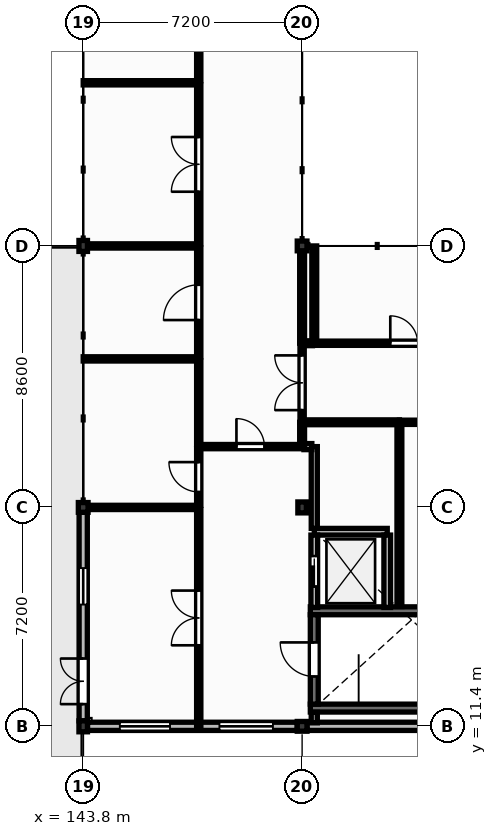
"""IFC4 building model, lengths in metres.
Left out: names, types, materials, properties, quantities, classifications, styles, units other than length and angle.
Written with IfcOpenShell. Run it as: python <this file> out.ifc"""

import sys

from ifc_helpers import new_model, si_unit, direction, frame, frame_2d, origin, origin_2d, place, context, subcontext, project, spatial, rectangle, extrude, element, fill, save


model = new_model("IFC4")
c1 = context("Model", 3, precision=1e-05, world=origin(), true_north=direction((0.0, 1.0)))
c2 = subcontext(c1, "Body", "Model", "MODEL_VIEW")
j1 = project(units=[si_unit("LENGTHUNIT", "METRE"), si_unit("PLANEANGLEUNIT", "RADIAN")], contexts=[c1])
p1 = place(None, origin())
s1 = spatial("IfcSite", under=j1, at=p1, CompositionType="ELEMENT")
p2 = place(p1, origin())
s2 = spatial("IfcBuilding", under=s1, at=p2, CompositionType="ELEMENT")
p3 = place(p2, frame((0.0, 0.0, 9.0)))
s3 = spatial("IfcBuildingStorey", under=s2, at=p3, CompositionType="ELEMENT", Elevation=9.0)
p4 = place(p3, frame((143.8, 11.4, 0.0), z_axis=(0.0, 0.0, 1.0), x_axis=(1.0, 0.0, 0.0)))
e1 = element("IfcColumn", 1, at=p4, inside=s3, PredefinedType="COLUMN", context=c2, shape_type="SweptSolid", body=[
    extrude(rectangle(XDim=0.28, YDim=0.36, at=origin_2d()), origin(), (0.0, 0.0, 1.0), 3.98),
])
p5 = place(p3, frame((143.8, 18.6, 0.0), z_axis=(0.0, 0.0, 1.0), x_axis=(1.0, 0.0, 0.0)))
e2 = element("IfcColumn", 2, at=p5, inside=s3, PredefinedType="COLUMN", context=c2, shape_type="SweptSolid", body=[
    extrude(rectangle(XDim=0.32, YDim=0.32, at=origin_2d()), origin(), (0.0, 0.0, 1.0), 3.98),
])
p6 = place(p3, frame((143.8, 27.2, 0.0), z_axis=(0.0, 0.0, 1.0), x_axis=(1.0, 0.0, 0.0)))
e3 = element("IfcColumn", 3, at=p6, inside=s3, PredefinedType="COLUMN", context=c2, shape_type="SweptSolid", body=[
    extrude(rectangle(XDim=0.28, YDim=0.36, at=origin_2d()), origin(), (0.0, 0.0, 1.0), 3.98),
])
p7 = place(p3, frame((151.0, 11.4, 0.0), z_axis=(0.0, 0.0, 1.0), x_axis=(1.0, 0.0, 0.0)))
e4 = element("IfcColumn", 4, at=p7, inside=s3, PredefinedType="COLUMN", context=c2, shape_type="SweptSolid", body=[
    extrude(rectangle(XDim=0.32, YDim=0.32, at=origin_2d()), origin(), (0.0, 0.0, 1.0), 5.775),
])
p8 = place(p3, frame((151.0, 18.6, 0.0), z_axis=(0.0, 0.0, 1.0), x_axis=(1.0, 0.0, 0.0)))
e5 = element("IfcColumn", 5, at=p8, inside=s3, PredefinedType="COLUMN", context=c2, shape_type="SweptSolid", body=[
    extrude(rectangle(XDim=0.28, YDim=0.36, at=origin_2d()), origin(), (0.0, 0.0, 1.0), 5.775),
])
p9 = place(p3, frame((151.0, 27.2, 0.0), z_axis=(0.0, 0.0, 1.0), x_axis=(1.0, 0.0, 0.0)))
e6 = element("IfcColumn", 6, at=p9, inside=s3, PredefinedType="COLUMN", context=c2, shape_type="SweptSolid", body=[
    extrude(rectangle(XDim=0.32, YDim=0.32, at=origin_2d()), origin(), (0.0, 0.0, 1.0), 5.775),
])
p10 = place(p3, frame((143.94, 11.4, 0.0), z_axis=(0.0, 0.0, 1.0), x_axis=(1.0, 0.0, 0.0)))
e7 = element("IfcWall", 7, at=p10, inside=s3, PredefinedType="SOLIDWALL", context=c2, shape_type="SweptSolid", body=[
    extrude(rectangle(XDim=6.9, YDim=0.27, at=frame_2d((3.45, 0.0))), origin(), (0.0, 0.0, 1.0), 3.54),
])
p11 = place(p10, frame((1.065, 0.0, 1.35)))
e8 = element("IfcOpeningElement", 8, at=p11, cuts=e7, PredefinedType="OPENING", context=c2, shape_type="SweptSolid", body=[
    extrude(rectangle(XDim=1.65, YDim=1.4, at=frame_2d((0.825, 0.7))), frame((0.0, 0.145, 0.0), z_axis=(0.0, -1.0, 0.0), x_axis=(1.0, 0.0, 0.0)), (0.0, 0.0, 1.0), 0.29),
])
p12 = place(p10, frame((4.34, 0.0, 1.0)))
e9 = element("IfcOpeningElement", 9, at=p12, cuts=e7, PredefinedType="OPENING", context=c2, shape_type="SweptSolid", body=[
    extrude(rectangle(XDim=1.76, YDim=1.95, at=frame_2d((0.88, 0.975))), frame((0.0, 0.145, 0.0), z_axis=(0.0, -1.0, 0.0), x_axis=(1.0, 0.0, 0.0)), (0.0, 0.0, 1.0), 0.29),
])
p13 = place(p3, frame((143.8, 11.58, 0.0), z_axis=(0.0, 0.0, 1.0), x_axis=(0.0, 1.0, 0.0)))
e10 = element("IfcWall", 10, at=p13, inside=s3, PredefinedType="SOLIDWALL", context=c2, shape_type="SweptSolid", body=[
    extrude(rectangle(XDim=6.86, YDim=0.27, at=frame_2d((3.43, 0.0))), origin(), (0.0, 0.0, 1.0), 4.0),
])
p14 = place(p13, frame((0.55, 0.0, 0.0)))
e11 = element("IfcOpeningElement", 11, at=p14, cuts=e10, PredefinedType="OPENING", context=c2, shape_type="SweptSolid", body=[
    extrude(rectangle(XDim=1.5, YDim=2.3, at=frame_2d((0.75, 1.15))), frame((0.0, 0.145, 0.0), z_axis=(0.0, -1.0, 0.0), x_axis=(1.0, 0.0, 0.0)), (0.0, 0.0, 1.0), 0.29),
])
p15 = place(p13, frame((3.825, 0.0, 1.0)))
e12 = element("IfcOpeningElement", 12, at=p15, cuts=e10, PredefinedType="OPENING", context=c2, shape_type="SweptSolid", body=[
    extrude(rectangle(XDim=1.2, YDim=1.95, at=frame_2d((0.6, 0.975))), frame((0.0, 0.145, 0.0), z_axis=(0.0, -1.0, 0.0), x_axis=(1.0, 0.0, 0.0)), (0.0, 0.0, 1.0), 0.29),
])
p16 = place(p3, frame((151.16, 11.4, 0.0), z_axis=(0.0, 0.0, 1.0), x_axis=(1.0, 0.0, 0.0)))
e13 = element("IfcWall", 13, at=p16, inside=s3, PredefinedType="SOLIDWALL", context=c2, shape_type="SweptSolid", body=[
    extrude(rectangle(XDim=6.9, YDim=0.27, at=frame_2d((3.45, 0.0))), origin(), (0.0, 0.0, 1.0), 3.54),
])
for number, where, z_axis, x_axis in (
    (14, (151.27, 12.0, 0.0), (0.0, 0.0, 1.0), (1.0, 0.0, 0.0)),
    (15, (151.27, 15.2, 0.0), (0.0, 0.0, 1.0), (1.0, 0.0, 0.0)),
):
    element("IfcWall", number, at=place(p3, frame(where, z_axis=z_axis, x_axis=x_axis)), inside=s3, PredefinedType="SHEAR", context=c2, shape_type="SweptSolid", body=[
        extrude(rectangle(XDim=6.66, YDim=0.26, at=frame_2d((3.33, 0.0))), origin(), (0.0, 0.0, 1.0), 3.95),
    ])
p17 = place(p3, frame((151.4, 12.13, 0.0), z_axis=(0.0, 0.0, 1.0), x_axis=(0.0, 1.0, 0.0)))
e16 = element("IfcWall", 16, at=p17, inside=s3, PredefinedType="SHEAR", context=c2, shape_type="SweptSolid", body=[
    extrude(rectangle(XDim=2.94, YDim=0.26, at=frame_2d((1.47, 0.0))), origin(), (0.0, 0.0, 1.0), 3.95),
])
p18 = place(p17, frame((0.91, 0.0, 0.0)))
e17 = element("IfcOpeningElement", 17, at=p18, cuts=e16, PredefinedType="OPENING", context=c2, shape_type="SweptSolid", body=[
    extrude(rectangle(XDim=1.12, YDim=2.1, at=frame_2d((0.56, 1.05))), frame((0.0, 0.14, 0.0), z_axis=(0.0, -1.0, 0.0), x_axis=(1.0, 0.0, 0.0)), (0.0, 0.0, 1.0), 0.28),
])
p19 = place(p3, frame((151.4, 17.8, 0.0), z_axis=(0.0, 0.0, 1.0), x_axis=(1.0, 0.0, 0.0)))
e18 = element("IfcWall", 18, at=p19, inside=s3, PredefinedType="SOLIDWALL", context=c2, shape_type="SweptSolid", body=[
    extrude(rectangle(XDim=2.4, YDim=0.22, at=frame_2d((1.2, 0.0))), origin(), (0.0, 0.0, 1.0), 3.95),
])
p20 = place(p3, frame((151.4, 15.31, 0.0), z_axis=(0.0, 0.0, 1.0), x_axis=(0.0, 1.0, 0.0)))
e19 = element("IfcWall", 19, at=p20, inside=s3, PredefinedType="SOLIDWALL", context=c2, shape_type="SweptSolid", body=[
    extrude(rectangle(XDim=2.38, YDim=0.22, at=frame_2d((1.19, 0.0))), origin(), (0.0, 0.0, 1.0), 3.95),
])
p21 = place(p20, frame((0.69, 0.0, 0.0)))
e20 = element("IfcOpeningElement", 20, at=p21, cuts=e19, PredefinedType="OPENING", context=c2, shape_type="SweptSolid", body=[
    extrude(rectangle(XDim=1.0, YDim=2.15, at=frame_2d((0.5, 1.075))), frame((0.0, 0.12, 0.0), z_axis=(0.0, -1.0, 0.0), x_axis=(1.0, 0.0, 0.0)), (0.0, 0.0, 1.0), 0.24),
])
p22 = place(p3, frame((153.8, 15.31, 0.0), z_axis=(0.0, 0.0, 1.0), x_axis=(0.0, 1.0, 0.0)))
e21 = element("IfcWall", 21, at=p22, inside=s3, PredefinedType="SOLIDWALL", context=c2, shape_type="SweptSolid", body=[
    extrude(rectangle(XDim=2.38, YDim=0.22, at=frame_2d((1.19, 0.0))), origin(), (0.0, 0.0, 1.0), 3.95),
])
p23 = place(p3, frame((143.96, 18.6, 0.0), z_axis=(0.0, 0.0, 1.0), x_axis=(1.0, 0.0, 0.0)))
e22 = element("IfcWall", 22, at=p23, inside=s3, PredefinedType="PARTITIONING", context=c2, shape_type="SweptSolid", body=[
    extrude(rectangle(XDim=3.64, YDim=0.14, at=frame_2d((1.82, 0.0))), origin(), (0.0, 0.0, 1.0), 3.78),
])
p24 = place(p3, frame((143.8, 23.485, 0.0), z_axis=(0.0, 0.0, 1.0), x_axis=(1.0, 0.0, 0.0)))
e23 = element("IfcWall", 23, at=p24, inside=s3, PredefinedType="PARTITIONING", context=c2, shape_type="SweptSolid", body=[
    extrude(rectangle(XDim=3.8, YDim=0.14, at=frame_2d((1.9, 0.0))), origin(), (0.0, 0.0, 1.0), 3.78),
])
p25 = place(p3, frame((143.94, 27.2, 0.0), z_axis=(0.0, 0.0, 1.0), x_axis=(1.0, 0.0, 0.0)))
e24 = element("IfcWall", 24, at=p25, inside=s3, PredefinedType="PARTITIONING", context=c2, shape_type="SweptSolid", body=[
    extrude(rectangle(XDim=3.66, YDim=0.14, at=frame_2d((1.83, 0.0))), origin(), (0.0, 0.0, 1.0), 3.78),
])
p26 = place(p3, frame((143.8, 32.566, 0.0), z_axis=(0.0, 0.0, 1.0), x_axis=(1.0, 0.0, 0.0)))
e25 = element("IfcWall", 25, at=p26, inside=s3, PredefinedType="PARTITIONING", context=c2, shape_type="SweptSolid", body=[
    extrude(rectangle(XDim=3.8, YDim=0.14, at=frame_2d((1.9, 0.0))), origin(), (0.0, 0.0, 1.0), 3.78),
])
p27 = place(p3, frame((147.6, 11.4, 0.0), z_axis=(0.0, 0.0, 1.0), x_axis=(0.0, 1.0, 0.0)))
e26 = element("IfcWall", 26, at=p27, inside=s3, PredefinedType="PARTITIONING", context=c2, shape_type="SweptSolid", body=[
    extrude(rectangle(XDim=7.13, YDim=0.14, at=frame_2d((3.565, 0.0))), origin(), (0.0, 0.0, 1.0), 3.78),
])
p28 = place(p27, frame((2.665, 0.0, 0.0)))
e27 = element("IfcOpeningElement", 27, at=p28, cuts=e26, PredefinedType="OPENING", context=c2, shape_type="SweptSolid", body=[
    extrude(rectangle(XDim=1.8, YDim=2.3, at=frame_2d((0.9, 1.15))), frame((0.0, 0.08, 0.0), z_axis=(0.0, -1.0, 0.0), x_axis=(1.0, 0.0, 0.0)), (0.0, 0.0, 1.0), 0.16),
])
p29 = place(p3, frame((147.6, 18.67, 0.0), z_axis=(0.0, 0.0, 1.0), x_axis=(0.0, 1.0, 0.0)))
e28 = element("IfcWall", 28, at=p29, inside=s3, PredefinedType="PARTITIONING", context=c2, shape_type="SweptSolid", body=[
    extrude(rectangle(XDim=1.86, YDim=0.14, at=frame_2d((0.93, 0.0))), origin(), (0.0, 0.0, 1.0), 3.78),
])
p30 = place(p29, frame((0.44, 0.0, 0.0)))
e29 = element("IfcOpeningElement", 29, at=p30, cuts=e28, PredefinedType="OPENING", context=c2, shape_type="SweptSolid", body=[
    extrude(rectangle(XDim=0.98, YDim=2.15, at=frame_2d((0.49, 1.075))), frame((0.0, 0.08, 0.0), z_axis=(0.0, -1.0, 0.0), x_axis=(1.0, 0.0, 0.0)), (0.0, 0.0, 1.0), 0.16),
])
p31 = place(p3, frame((147.6, 20.67, 0.0), z_axis=(0.0, 0.0, 1.0), x_axis=(0.0, 1.0, 0.0)))
e30 = element("IfcWall", 30, at=p31, inside=s3, PredefinedType="PARTITIONING", context=c2, shape_type="SweptSolid", body=[
    extrude(rectangle(XDim=2.745, YDim=0.14, at=frame_2d((1.373, 0.0))), origin(), (0.0, 0.0, 1.0), 3.78),
])
p32 = place(p3, frame((147.6, 20.6, 0.0), z_axis=(0.0, 0.0, 1.0), x_axis=(1.0, 0.0, 0.0)))
e31 = element("IfcWall", 31, at=p32, inside=s3, PredefinedType="PARTITIONING", context=c2, shape_type="SweptSolid", body=[
    extrude(rectangle(XDim=3.4, YDim=0.14, at=frame_2d((1.7, 0.0))), origin(), (0.0, 0.0, 1.0), 3.78),
])
p33 = place(p32, frame((1.24, 0.0, 0.0)))
e32 = element("IfcOpeningElement", 32, at=p33, cuts=e31, PredefinedType="OPENING", context=c2, shape_type="SweptSolid", body=[
    extrude(rectangle(XDim=0.92, YDim=2.1, at=frame_2d((0.46, 1.05))), frame((0.0, 0.08, 0.0), z_axis=(0.0, -1.0, 0.0), x_axis=(1.0, 0.0, 0.0)), (0.0, 0.0, 1.0), 0.16),
])
p34 = place(p3, frame((147.6, 23.555, 0.0), z_axis=(0.0, 0.0, 1.0), x_axis=(0.0, 1.0, 0.0)))
e33 = element("IfcWall", 33, at=p34, inside=s3, PredefinedType="PARTITIONING", context=c2, shape_type="SweptSolid", body=[
    extrude(rectangle(XDim=3.575, YDim=0.14, at=frame_2d((1.788, 0.0))), origin(), (0.0, 0.0, 1.0), 3.78),
])
p35 = place(p34, frame((1.208, 0.0, 0.0)))
e34 = element("IfcOpeningElement", 34, at=p35, cuts=e33, PredefinedType="OPENING", context=c2, shape_type="SweptSolid", body=[
    extrude(rectangle(XDim=1.16, YDim=2.1, at=frame_2d((0.58, 1.05))), frame((0.0, 0.08, 0.0), z_axis=(0.0, -1.0, 0.0), x_axis=(1.0, 0.0, 0.0)), (0.0, 0.0, 1.0), 0.16),
])
p36 = place(p3, frame((147.6, 27.27, 0.0), z_axis=(0.0, 0.0, 1.0), x_axis=(0.0, 1.0, 0.0)))
e35 = element("IfcWall", 35, at=p36, inside=s3, PredefinedType="PARTITIONING", context=c2, shape_type="SweptSolid", body=[
    extrude(rectangle(XDim=5.226, YDim=0.14, at=frame_2d((2.613, 0.0))), origin(), (0.0, 0.0, 1.0), 3.78),
])
p37 = place(p36, frame((1.713, 0.0, 0.0)))
e36 = element("IfcOpeningElement", 36, at=p37, cuts=e35, PredefinedType="OPENING", context=c2, shape_type="SweptSolid", body=[
    extrude(rectangle(XDim=1.8, YDim=2.3, at=frame_2d((0.9, 1.15))), frame((0.0, 0.08, 0.0), z_axis=(0.0, -1.0, 0.0), x_axis=(1.0, 0.0, 0.0)), (0.0, 0.0, 1.0), 0.16),
])
p38 = place(p3, frame((147.6, 32.636, 0.0), z_axis=(0.0, 0.0, 1.0), x_axis=(0.0, 1.0, 0.0)))
e37 = element("IfcWall", 37, at=p38, inside=s3, PredefinedType="PARTITIONING", context=c2, shape_type="SweptSolid", body=[
    extrude(rectangle(XDim=4.094, YDim=0.14, at=frame_2d((2.047, 0.0))), origin(), (0.0, 0.0, 1.0), 3.78),
])
p39 = place(p38, frame((1.147, 0.0, 0.0)))
e38 = element("IfcOpeningElement", 38, at=p39, cuts=e37, PredefinedType="OPENING", context=c2, shape_type="SweptSolid", body=[
    extrude(rectangle(XDim=1.8, YDim=2.3, at=frame_2d((0.9, 1.15))), frame((0.0, 0.08, 0.0), z_axis=(0.0, -1.0, 0.0), x_axis=(1.0, 0.0, 0.0)), (0.0, 0.0, 1.0), 0.16),
])
p40 = place(p3, frame((151.0, 21.4, 0.0), z_axis=(0.0, 0.0, 1.0), x_axis=(0.0, 1.0, 0.0)))
e39 = element("IfcWall", 39, at=p40, inside=s3, PredefinedType="PARTITIONING", context=c2, shape_type="SweptSolid", body=[
    extrude(rectangle(XDim=2.6, YDim=0.14, at=frame_2d((1.3, 0.0))), origin(), (0.0, 0.0, 1.0), 3.78),
])
p41 = place(p40, frame((0.4, 0.0, 0.0)))
e40 = element("IfcOpeningElement", 40, at=p41, cuts=e39, PredefinedType="OPENING", context=c2, shape_type="SweptSolid", body=[
    extrude(rectangle(XDim=1.8, YDim=2.3, at=frame_2d((0.9, 1.15))), frame((0.0, 0.08, 0.0), z_axis=(0.0, -1.0, 0.0), x_axis=(1.0, 0.0, 0.0)), (0.0, 0.0, 1.0), 0.16),
])
p42 = place(p3, frame((151.4, 24.0, 0.0), z_axis=(0.0, 0.0, 1.0), x_axis=(1.0, 0.0, 0.0)))
e41 = element("IfcWall", 41, at=p42, inside=s3, PredefinedType="PARTITIONING", context=c2, shape_type="SweptSolid", body=[
    extrude(rectangle(XDim=6.8, YDim=0.14, at=frame_2d((3.4, 0.0))), origin(), (0.0, 0.0, 1.0), 3.78),
])
p43 = place(p42, frame((2.5, 0.0, 0.0)))
e42 = element("IfcOpeningElement", 42, at=p43, cuts=e41, PredefinedType="OPENING", context=c2, shape_type="SweptSolid", body=[
    extrude(rectangle(XDim=1.8, YDim=2.3, at=frame_2d((0.9, 1.15))), frame((0.0, 0.08, 0.0), z_axis=(0.0, -1.0, 0.0), x_axis=(1.0, 0.0, 0.0)), (0.0, 0.0, 1.0), 0.16),
])
p44 = place(p3, frame((154.2, 21.4, 0.0), z_axis=(0.0, 0.0, 1.0), x_axis=(1.0, 0.0, 0.0)))
e43 = element("IfcWall", 43, at=p44, inside=s3, PredefinedType="PARTITIONING", context=c2, shape_type="SweptSolid", body=[
    extrude(rectangle(XDim=2.6, YDim=0.14, at=frame_2d((1.3, 0.0))), origin(), (0.0, 0.0, 1.0), 3.78),
])
p45 = place(p44, frame((0.74, 0.0, 0.0)))
e44 = element("IfcOpeningElement", 44, at=p45, cuts=e43, PredefinedType="OPENING", context=c2, shape_type="SweptSolid", body=[
    extrude(rectangle(XDim=1.12, YDim=2.15, at=frame_2d((0.56, 1.075))), frame((0.0, 0.08, 0.0), z_axis=(0.0, -1.0, 0.0), x_axis=(1.0, 0.0, 0.0)), (0.0, 0.0, 1.0), 0.16),
])
p46 = place(p3, frame((151.4, 11.515, 0.0), z_axis=(0.0, 0.0, 1.0), x_axis=(0.0, 1.0, 0.0)))
e45 = element("IfcWall", 45, at=p46, inside=s3, PredefinedType="PARTITIONING", context=c2, shape_type="SweptSolid", body=[
    extrude(rectangle(XDim=0.345, YDim=0.2, at=frame_2d((0.173, 0.0))), origin(), (0.0, 0.0, 1.0), 3.78),
])
p47 = place(p3, frame((151.4, 17.91, 0.0), z_axis=(0.0, 0.0, 1.0), x_axis=(0.0, 1.0, 0.0)))
e46 = element("IfcWall", 46, at=p47, inside=s3, PredefinedType="PARTITIONING", context=c2, shape_type="SweptSolid", body=[
    extrude(rectangle(XDim=2.69, YDim=0.2, at=frame_2d((1.345, 0.0))), origin(), (0.0, 0.0, 1.0), 3.78),
])
p48 = place(p3, frame((151.32, 20.6, 0.0), z_axis=(0.0, 0.0, 1.0), x_axis=(-1.0, 0.0, 0.0)))
e47 = element("IfcWall", 47, at=p48, inside=s3, PredefinedType="PARTITIONING", context=c2, shape_type="SweptSolid", body=[
    extrude(rectangle(XDim=0.26, YDim=0.2, at=frame_2d((0.13, 0.0))), origin(), (0.0, 0.0, 1.0), 3.78),
])
p49 = place(p3, frame((151.0, 20.67, 0.0), z_axis=(0.0, 0.0, 1.0), x_axis=(0.0, 1.0, 0.0)))
e48 = element("IfcWall", 48, at=p49, inside=s3, PredefinedType="PARTITIONING", context=c2, shape_type="SweptSolid", body=[
    extrude(rectangle(XDim=0.73, YDim=0.16, at=frame_2d((0.365, 0.0))), origin(), (0.0, 0.0, 1.0), 3.78),
])
p50 = place(p3, frame((151.0, 24.0, 0.0), z_axis=(0.0, 0.0, 1.0), x_axis=(0.0, 1.0, 0.0)))
e49 = element("IfcWall", 49, at=p50, inside=s3, PredefinedType="PARTITIONING", context=c2, shape_type="SweptSolid", body=[
    extrude(rectangle(XDim=3.04, YDim=0.16, at=frame_2d((1.52, 0.0))), origin(), (0.0, 0.0, 1.0), 3.78),
])
p51 = place(p3, frame((151.0, 21.4, 0.0), z_axis=(0.0, 0.0, 1.0), x_axis=(1.0, 0.0, 0.0)))
e50 = element("IfcWall", 50, at=p51, inside=s3, PredefinedType="PARTITIONING", context=c2, shape_type="SweptSolid", body=[
    extrude(rectangle(XDim=3.2, YDim=0.16, at=frame_2d((1.6, 0.0))), origin(), (0.0, 0.0, 1.0), 3.78),
])
p52 = place(p3, frame((151.34, 24.0, 0.0), z_axis=(0.0, 0.0, 1.0), x_axis=(-1.0, 0.0, 0.0)))
e51 = element("IfcWall", 51, at=p52, inside=s3, PredefinedType="PARTITIONING", context=c2, shape_type="SweptSolid", body=[
    extrude(rectangle(XDim=0.28, YDim=0.16, at=frame_2d((0.14, 0.0))), origin(), (0.0, 0.0, 1.0), 3.78),
])
p53 = place(p3, frame((154.2, 15.34, 0.0), z_axis=(0.0, 0.0, 1.0), x_axis=(0.0, 1.0, 0.0)))
e52 = element("IfcWall", 52, at=p53, inside=s3, PredefinedType="PARTITIONING", context=c2, shape_type="SweptSolid", body=[
    extrude(rectangle(XDim=5.99, YDim=0.16, at=frame_2d((2.995, 0.0))), origin(), (0.0, 0.0, 1.0), 3.78),
])
p54 = place(p3, frame((151.4, 24.07, 0.0), z_axis=(0.0, 0.0, 1.0), x_axis=(0.0, 1.0, 0.0)))
e53 = element("IfcWall", 53, at=p54, inside=s3, PredefinedType="PARTITIONING", context=c2, shape_type="SweptSolid", body=[
    extrude(rectangle(XDim=3.13, YDim=0.16, at=frame_2d((1.565, 0.0))), origin(), (0.0, 0.0, 1.0), 3.78),
])
p55 = place(p11, origin())
e54 = element("IfcWindow", 54, at=p55, inside=s3, PartitioningType="DOUBLE_PANEL_VERTICAL", PredefinedType="WINDOW", context=c2, shape_type="SweptSolid", body=[
    extrude(rectangle(XDim=1.65, YDim=1.4, at=frame_2d((0.825, 0.7))), frame((0.0, 0.03, 0.0), z_axis=(0.0, -1.0, 0.0), x_axis=(1.0, 0.0, 0.0)), (0.0, 0.0, 1.0), 0.06),
])
fill(e8, e54)
p56 = place(p12, origin())
e55 = element("IfcWindow", 55, at=p56, inside=s3, PartitioningType="DOUBLE_PANEL_VERTICAL", PredefinedType="WINDOW", context=c2, shape_type="SweptSolid", body=[
    extrude(rectangle(XDim=1.76, YDim=1.95, at=frame_2d((0.88, 0.975))), frame((0.0, 0.03, 0.0), z_axis=(0.0, -1.0, 0.0), x_axis=(1.0, 0.0, 0.0)), (0.0, 0.0, 1.0), 0.06),
])
fill(e9, e55)
p57 = place(p14, origin())
e56 = element("IfcDoor", 56, at=p57, inside=s3, OperationType="DOUBLE_DOOR_SINGLE_SWING", PredefinedType="DOOR", context=c2, shape_type="SweptSolid", body=[
    extrude(rectangle(XDim=1.5, YDim=2.3, at=frame_2d((0.75, 1.15))), frame((0.0, 0.025, 0.0), z_axis=(0.0, -1.0, 0.0), x_axis=(1.0, 0.0, 0.0)), (0.0, 0.0, 1.0), 0.05),
])
fill(e11, e56)
p58 = place(p15, origin())
e57 = element("IfcWindow", 57, at=p58, inside=s3, PartitioningType="SINGLE_PANEL", PredefinedType="WINDOW", context=c2, shape_type="SweptSolid", body=[
    extrude(rectangle(XDim=1.2, YDim=1.95, at=frame_2d((0.6, 0.975))), frame((0.0, 0.03, 0.0), z_axis=(0.0, -1.0, 0.0), x_axis=(1.0, 0.0, 0.0)), (0.0, 0.0, 1.0), 0.06),
])
fill(e12, e57)
p59 = place(p21, origin())
e58 = element("IfcDoor", 58, at=p59, inside=s3, OperationType="SLIDING_TO_LEFT", PredefinedType="DOOR", context=c2, shape_type="SweptSolid", body=[
    extrude(rectangle(XDim=1.0, YDim=2.15, at=frame_2d((0.5, 1.075))), frame((0.0, 0.025, 0.0), z_axis=(0.0, -1.0, 0.0), x_axis=(1.0, 0.0, 0.0)), (0.0, 0.0, 1.0), 0.05),
])
fill(e20, e58)
p60 = place(p18, origin())
e59 = element("IfcDoor", 59, at=p60, inside=s3, OperationType="SINGLE_SWING_RIGHT", PredefinedType="DOOR", context=c2, shape_type="SweptSolid", body=[
    extrude(rectangle(XDim=1.12, YDim=2.1, at=frame_2d((0.56, 1.05))), frame((0.0, 0.025, 0.0), z_axis=(0.0, -1.0, 0.0), x_axis=(1.0, 0.0, 0.0)), (0.0, 0.0, 1.0), 0.05),
])
fill(e17, e59)
p61 = place(p33, origin())
e60 = element("IfcDoor", 60, at=p61, inside=s3, OperationType="SINGLE_SWING_LEFT", PredefinedType="DOOR", context=c2, shape_type="SweptSolid", body=[
    extrude(rectangle(XDim=0.92, YDim=2.1, at=frame_2d((0.46, 1.05))), frame((0.0, 0.025, 0.0), z_axis=(0.0, -1.0, 0.0), x_axis=(1.0, 0.0, 0.0)), (0.0, 0.0, 1.0), 0.05),
])
fill(e32, e60)
p62 = place(p41, origin())
e61 = element("IfcDoor", 61, at=p62, inside=s3, OperationType="DOUBLE_DOOR_SINGLE_SWING", PredefinedType="DOOR", context=c2, shape_type="SweptSolid", body=[
    extrude(rectangle(XDim=1.8, YDim=2.3, at=frame_2d((0.9, 1.15))), frame((0.0, 0.025, 0.0), z_axis=(0.0, -1.0, 0.0), x_axis=(1.0, 0.0, 0.0)), (0.0, 0.0, 1.0), 0.05),
])
fill(e40, e61)
p63 = place(p28, origin())
e62 = element("IfcDoor", 62, at=p63, inside=s3, OperationType="DOUBLE_DOOR_SINGLE_SWING", PredefinedType="DOOR", context=c2, shape_type="SweptSolid", body=[
    extrude(rectangle(XDim=1.8, YDim=2.3, at=frame_2d((0.9, 1.15))), frame((0.0, 0.025, 0.0), z_axis=(0.0, -1.0, 0.0), x_axis=(1.0, 0.0, 0.0)), (0.0, 0.0, 1.0), 0.05),
])
fill(e27, e62)
p64 = place(p30, origin())
e63 = element("IfcDoor", 63, at=p64, inside=s3, OperationType="SINGLE_SWING_RIGHT", PredefinedType="DOOR", context=c2, shape_type="SweptSolid", body=[
    extrude(rectangle(XDim=0.98, YDim=2.15, at=frame_2d((0.49, 1.075))), frame((0.0, 0.025, 0.0), z_axis=(0.0, -1.0, 0.0), x_axis=(1.0, 0.0, 0.0)), (0.0, 0.0, 1.0), 0.05),
])
fill(e29, e63)
p65 = place(p35, origin())
e64 = element("IfcDoor", 64, at=p65, inside=s3, OperationType="SINGLE_SWING_LEFT", PredefinedType="DOOR", context=c2, shape_type="SweptSolid", body=[
    extrude(rectangle(XDim=1.16, YDim=2.1, at=frame_2d((0.58, 1.05))), frame((0.0, 0.025, 0.0), z_axis=(0.0, -1.0, 0.0), x_axis=(1.0, 0.0, 0.0)), (0.0, 0.0, 1.0), 0.05),
])
fill(e34, e64)
p66 = place(p37, origin())
e65 = element("IfcDoor", 65, at=p66, inside=s3, OperationType="DOUBLE_DOOR_SINGLE_SWING", PredefinedType="DOOR", context=c2, shape_type="SweptSolid", body=[
    extrude(rectangle(XDim=1.8, YDim=2.3, at=frame_2d((0.9, 1.15))), frame((0.0, 0.025, 0.0), z_axis=(0.0, -1.0, 0.0), x_axis=(1.0, 0.0, 0.0)), (0.0, 0.0, 1.0), 0.05),
])
fill(e36, e65)
p67 = place(p43, origin())
e66 = element("IfcDoor", 66, at=p67, inside=s3, OperationType="DOUBLE_DOOR_SINGLE_SWING", PredefinedType="DOOR", context=c2, shape_type="SweptSolid", body=[
    extrude(rectangle(XDim=1.8, YDim=2.3, at=frame_2d((0.9, 1.15))), frame((0.0, 0.025, 0.0), z_axis=(0.0, -1.0, 0.0), x_axis=(1.0, 0.0, 0.0)), (0.0, 0.0, 1.0), 0.05),
])
fill(e42, e66)
save(model, sys.argv[1])
